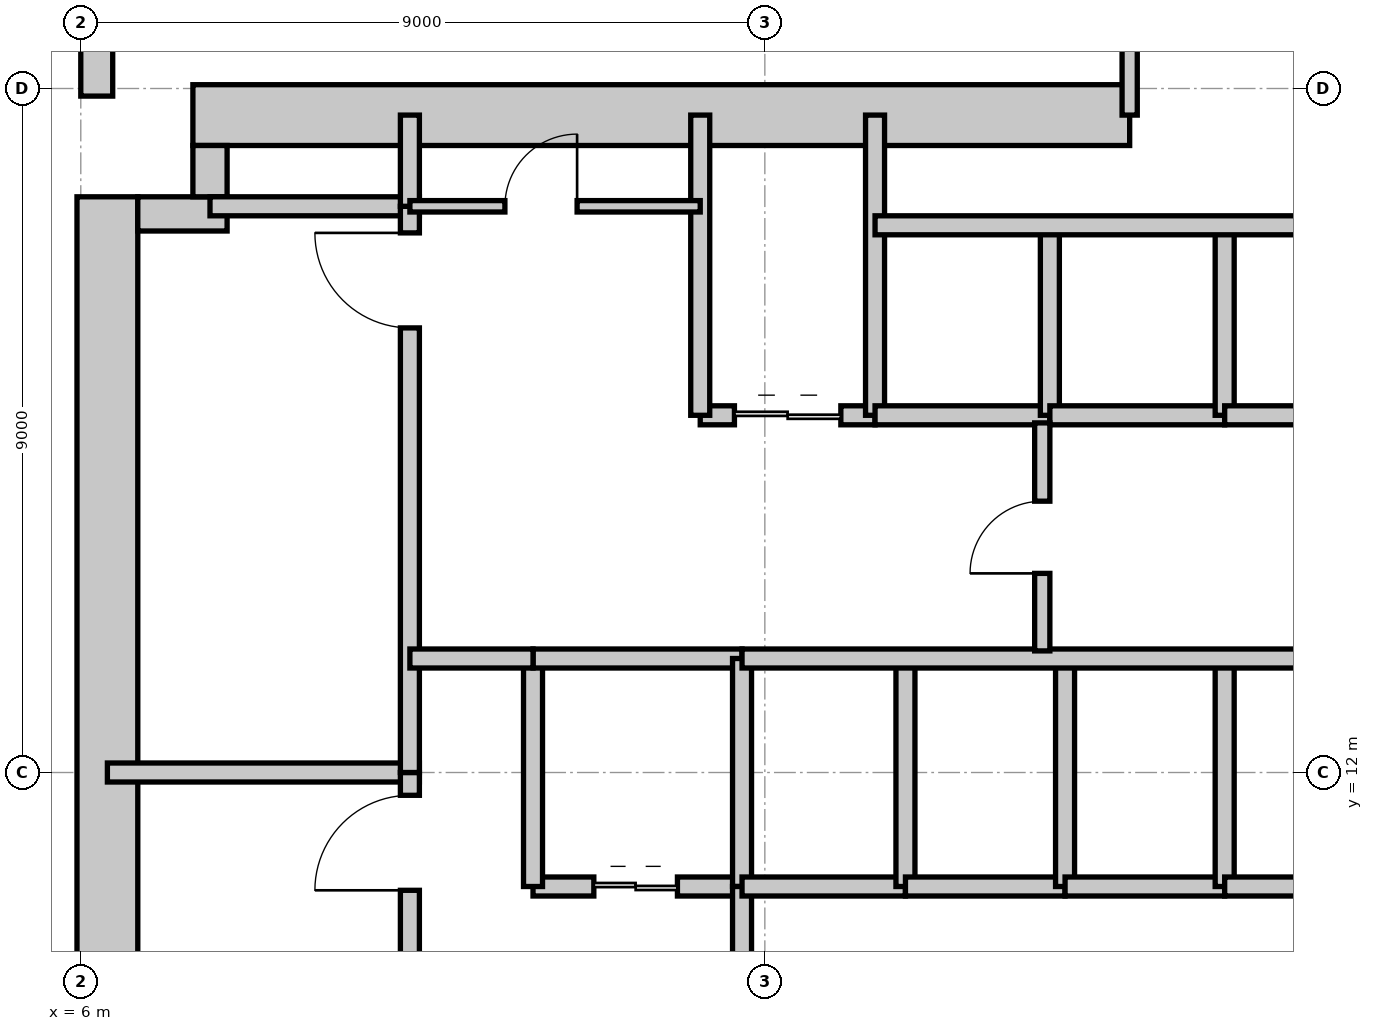
"""IFC4 building model, lengths in metres.
Left out: names, types, materials, properties, quantities, classifications, styles, units other than length and angle.
Written with IfcOpenShell. Run it as: python <this file> out.ifc"""

import sys

from ifc_helpers import new_model, si_unit, direction, frame, frame_2d, origin, place, context, subcontext, project, spatial, rectangle, extrude, element, fill, save


model = new_model("IFC4")
c1 = context("Model", 3, precision=1e-05, world=origin(), true_north=direction((0.0, 1.0)))
c2 = subcontext(c1, "Body", "Model", "MODEL_VIEW")
j1 = project(units=[si_unit("LENGTHUNIT", "METRE"), si_unit("PLANEANGLEUNIT", "RADIAN")], contexts=[c1])
p1 = place(None, origin())
s1 = spatial("IfcSite", under=j1, at=p1, CompositionType="ELEMENT")
p2 = place(p1, origin())
s2 = spatial("IfcBuilding", under=s1, at=p2, CompositionType="ELEMENT")
p3 = place(p2, frame((0.0, 0.0, 38.4)))
s3 = spatial("IfcBuildingStorey", under=s2, at=p3, CompositionType="ELEMENT", Elevation=38.4)
p4 = place(p3, frame((6.35, 4.425, 0.0), z_axis=(0.0, 0.0, 1.0), x_axis=(0.0, 1.0, 0.0)))
e1 = element("IfcWall", 1, at=p4, inside=s3, PredefinedType="SHEAR", context=c2, shape_type="SweptSolid", body=[
    extrude(rectangle(XDim=15.15, YDim=0.8, at=frame_2d((7.575, 0.0))), origin(), (0.0, 0.0, 1.0), 4.2),
])
p5 = place(p3, frame((7.475, 20.65, 0.0), z_axis=(0.0, 0.0, 1.0), x_axis=(1.0, 0.0, 0.0)))
e2 = element("IfcWall", 2, at=p5, inside=s3, PredefinedType="SHEAR", context=c2, shape_type="SweptSolid", body=[
    extrude(rectangle(XDim=12.325, YDim=0.8, at=frame_2d((6.163, 0.0))), origin(), (0.0, 0.0, 1.0), 4.2),
])
p6 = place(p3, frame((6.75, 19.35, 0.0), z_axis=(0.0, 0.0, 1.0), x_axis=(1.0, 0.0, 0.0)))
e3 = element("IfcWall", 3, at=p6, inside=s3, PredefinedType="SHEAR", context=c2, shape_type="SweptSolid", body=[
    extrude(rectangle(XDim=1.175, YDim=0.45, at=frame_2d((0.587, 0.0))), origin(), (0.0, 0.0, 1.0), 4.2),
])
p7 = place(p3, frame((7.7, 19.575, 0.0), z_axis=(0.0, 0.0, 1.0), x_axis=(0.0, 1.0, 0.0)))
e4 = element("IfcWall", 4, at=p7, inside=s3, PredefinedType="SHEAR", context=c2, shape_type="SweptSolid", body=[
    extrude(rectangle(XDim=0.675, YDim=0.45, at=frame_2d((0.337, 0.0))), origin(), (0.0, 0.0, 1.0), 4.2),
])
p8 = place(p3, frame((6.21, 49.4, 0.0), z_axis=(0.0, 0.0, 1.0), x_axis=(0.0, -1.0, 0.0)))
e5 = element("IfcWall", 5, at=p8, inside=s3, PredefinedType="STANDARD", context=c2, shape_type="SweptSolid", body=[
    extrude(rectangle(XDim=28.5, YDim=0.42, at=frame_2d((14.25, 0.0))), origin(), (0.0, 0.0, 1.0), 3.98),
])
p9 = place(p8, frame((15.225, 0.0, 0.85)))
e6 = element("IfcOpeningElement", 6, at=p9, cuts=e5, PredefinedType="OPENING", context=c2, shape_type="SweptSolid", body=[
    extrude(rectangle(XDim=2.8, YDim=2.45, at=frame_2d((1.4, 1.225))), frame((0.0, 0.22, 0.0), z_axis=(0.0, -1.0, 0.0), x_axis=(1.0, 0.0, 0.0)), (0.0, 0.0, 1.0), 0.44),
])
p10 = place(p3, frame((6.35, 12.0, 0.0), z_axis=(0.0, 0.0, 1.0), x_axis=(1.0, 0.0, 0.0)))
e7 = element("IfcWall", 7, at=p10, inside=s3, PredefinedType="SHEAR", context=c2, shape_type="SweptSolid", body=[
    extrude(rectangle(XDim=4.105, YDim=0.25, at=frame_2d((2.052, 0.0))), origin(), (0.0, 0.0, 1.0), 4.2),
])
p11 = place(p3, frame((7.7, 19.45, 0.0), z_axis=(0.0, 0.0, 1.0), x_axis=(1.0, 0.0, 0.0)))
e8 = element("IfcWall", 8, at=p11, inside=s3, PredefinedType="SHEAR", context=c2, shape_type="SweptSolid", body=[
    extrude(rectangle(XDim=2.755, YDim=0.25, at=frame_2d((1.377, 0.0))), origin(), (0.0, 0.0, 1.0), 4.2),
])
p12 = place(p3, frame((10.33, 4.55, 0.0), z_axis=(0.0, 0.0, 1.0), x_axis=(0.0, 1.0, 0.0)))
e9 = element("IfcWall", 9, at=p12, inside=s3, PredefinedType="SHEAR", context=c2, shape_type="SweptSolid", body=[
    extrude(rectangle(XDim=7.45, YDim=0.25, at=frame_2d((3.725, 0.0))), origin(), (0.0, 0.0, 1.0), 4.2),
])
p13 = place(p12, frame((5.9, 0.0, 0.0)))
e10 = element("IfcOpeningElement", 10, at=p13, cuts=e9, PredefinedType="OPENING", context=c2, shape_type="SweptSolid", body=[
    extrude(rectangle(XDim=1.25, YDim=2.2, at=frame_2d((0.625, 1.1))), frame((0.0, 0.135, 0.0), z_axis=(0.0, -1.0, 0.0), x_axis=(1.0, 0.0, 0.0)), (0.0, 0.0, 1.0), 0.27),
])
p14 = place(p3, frame((10.33, 12.0, 0.0), z_axis=(0.0, 0.0, 1.0), x_axis=(0.0, 1.0, 0.0)))
e11 = element("IfcWall", 11, at=p14, inside=s3, PredefinedType="SHEAR", context=c2, shape_type="SweptSolid", body=[
    extrude(rectangle(XDim=7.45, YDim=0.25, at=frame_2d((3.725, 0.0))), origin(), (0.0, 0.0, 1.0), 4.2),
])
p15 = place(p14, frame((5.85, 0.0, 0.0)))
e12 = element("IfcOpeningElement", 12, at=p15, cuts=e11, PredefinedType="OPENING", context=c2, shape_type="SweptSolid", body=[
    extrude(rectangle(XDim=1.25, YDim=2.2, at=frame_2d((0.625, 1.1))), frame((0.0, 0.135, 0.0), z_axis=(0.0, -1.0, 0.0), x_axis=(1.0, 0.0, 0.0)), (0.0, 0.0, 1.0), 0.27),
])
p16 = place(p3, frame((10.33, 19.45, 0.0), z_axis=(0.0, 0.0, 1.0), x_axis=(0.0, 1.0, 0.0)))
e13 = element("IfcWall", 13, at=p16, inside=s3, PredefinedType="PARTITIONING", context=c2, shape_type="SweptSolid", body=[
    extrude(rectangle(XDim=1.2, YDim=0.25, at=frame_2d((0.6, 0.0))), origin(), (0.0, 0.0, 1.0), 3.114),
])
p17 = place(p3, frame((11.95, 10.5, 0.0), z_axis=(0.0, 0.0, 1.0), x_axis=(1.0, 0.0, 0.0)))
e14 = element("IfcWall", 14, at=p17, inside=s3, PredefinedType="PARTITIONING", context=c2, shape_type="SweptSolid", body=[
    extrude(rectangle(XDim=2.75, YDim=0.25, at=frame_2d((1.375, 0.0))), origin(), (0.0, 0.0, 1.0), 3.426),
])
p18 = place(p17, frame((0.8, 0.0, 0.0)))
e15 = element("IfcOpeningElement", 15, at=p18, cuts=e14, PredefinedType="OPENING", context=c2, shape_type="SweptSolid", body=[
    extrude(rectangle(XDim=1.1, YDim=2.25, at=frame_2d((0.55, 1.125))), frame((0.0, 0.135, 0.0), z_axis=(0.0, -1.0, 0.0), x_axis=(1.0, 0.0, 0.0)), (0.0, 0.0, 1.0), 0.27),
])
p19 = place(p3, frame((11.95, 10.5, 0.0), z_axis=(0.0, 0.0, 1.0), x_axis=(0.0, 1.0, 0.0)))
e16 = element("IfcWall", 16, at=p19, inside=s3, PredefinedType="PARTITIONING", context=c2, shape_type="SweptSolid", body=[
    extrude(rectangle(XDim=3.0, YDim=0.25, at=frame_2d((1.5, 0.0))), origin(), (0.0, 0.0, 1.0), 3.97),
])
p20 = place(p3, frame((11.95, 13.5, 0.0), z_axis=(0.0, 0.0, 1.0), x_axis=(1.0, 0.0, 0.0)))
e17 = element("IfcWall", 17, at=p20, inside=s3, PredefinedType="PARTITIONING", context=c2, shape_type="SweptSolid", body=[
    extrude(rectangle(XDim=2.75, YDim=0.25, at=frame_2d((1.375, 0.0))), origin(), (0.0, 0.0, 1.0), 3.426),
])
p21 = place(p3, frame((14.7, 10.5, 0.0), z_axis=(0.0, 0.0, 1.0), x_axis=(0.0, 1.0, 0.0)))
e18 = element("IfcWall", 18, at=p21, inside=s3, PredefinedType="PARTITIONING", context=c2, shape_type="SweptSolid", body=[
    extrude(rectangle(XDim=3.0, YDim=0.25, at=frame_2d((1.5, 0.0))), origin(), (0.0, 0.0, 1.0), 3.97),
])
p22 = place(p3, frame((14.7, 6.7, 0.0), z_axis=(0.0, 0.0, 1.0), x_axis=(0.0, 1.0, 0.0)))
e19 = element("IfcWall", 19, at=p22, inside=s3, PredefinedType="PARTITIONING", context=c2, shape_type="SweptSolid", body=[
    extrude(rectangle(XDim=3.8, YDim=0.25, at=frame_2d((1.9, 0.0))), origin(), (0.0, 0.0, 1.0), 3.97),
])
p23 = place(p22, frame((1.3, 0.0, 0.0)))
e20 = element("IfcOpeningElement", 20, at=p23, cuts=e19, PredefinedType="OPENING", context=c2, shape_type="SweptSolid", body=[
    extrude(rectangle(XDim=1.2, YDim=2.2, at=frame_2d((0.6, 1.1))), frame((0.0, 0.135, 0.0), z_axis=(0.0, -1.0, 0.0), x_axis=(1.0, 0.0, 0.0)), (0.0, 0.0, 1.0), 0.27),
])
p24 = place(p3, frame((10.33, 13.5, 0.0), z_axis=(0.0, 0.0, 1.0), x_axis=(1.0, 0.0, 0.0)))
e21 = element("IfcWall", 21, at=p24, inside=s3, PredefinedType="PARTITIONING", context=c2, shape_type="SweptSolid", body=[
    extrude(rectangle(XDim=1.62, YDim=0.25, at=frame_2d((0.81, 0.0))), origin(), (0.0, 0.0, 1.0), 3.426),
])
p25 = place(p3, frame((14.15, 16.7, 0.0), z_axis=(0.0, 0.0, 1.0), x_axis=(1.0, 0.0, 0.0)))
e22 = element("IfcWall", 22, at=p25, inside=s3, PredefinedType="PARTITIONING", context=c2, shape_type="SweptSolid", body=[
    extrude(rectangle(XDim=2.3, YDim=0.25, at=frame_2d((1.15, 0.0))), origin(), (0.0, 0.0, 1.0), 3.426),
])
p26 = place(p25, frame((0.45, 0.0, 0.0)))
e23 = element("IfcOpeningElement", 23, at=p26, cuts=e22, PredefinedType="OPENING", context=c2, shape_type="SweptSolid", body=[
    extrude(rectangle(XDim=1.4, YDim=2.35, at=frame_2d((0.7, 1.175))), frame((0.0, 0.135, 0.0), z_axis=(0.0, -1.0, 0.0), x_axis=(1.0, 0.0, 0.0)), (0.0, 0.0, 1.0), 0.27),
])
for number, where, z_axis, x_axis in (
    (24, (14.15, 16.7, 0.0), (0.0, 0.0, 1.0), (0.0, 1.0, 0.0)),
    (25, (16.45, 16.7, 0.0), (0.0, 0.0, 1.0), (0.0, 1.0, 0.0)),
):
    element("IfcWall", number, at=place(p3, frame(where, z_axis=z_axis, x_axis=x_axis)), inside=s3, PredefinedType="PARTITIONING", context=c2, shape_type="SweptSolid", body=[
        extrude(rectangle(XDim=3.95, YDim=0.25, at=frame_2d((1.975, 0.0))), origin(), (0.0, 0.0, 1.0), 3.97),
    ])
p27 = place(p3, frame((16.45, 16.7, 0.0), z_axis=(0.0, 0.0, 1.0), x_axis=(1.0, 0.0, 0.0)))
e26 = element("IfcWall", 26, at=p27, inside=s3, PredefinedType="PARTITIONING", context=c2, shape_type="SweptSolid", body=[
    extrude(rectangle(XDim=2.3, YDim=0.25, at=frame_2d((1.15, 0.0))), origin(), (0.0, 0.0, 1.0), 3.426),
])
p28 = place(p3, frame((18.75, 16.7, 0.0), z_axis=(0.0, 0.0, 1.0), x_axis=(0.0, 1.0, 0.0)))
e27 = element("IfcWall", 27, at=p28, inside=s3, PredefinedType="PARTITIONING", context=c2, shape_type="SweptSolid", body=[
    extrude(rectangle(XDim=2.5, YDim=0.25, at=frame_2d((1.25, 0.0))), origin(), (0.0, 0.0, 1.0), 3.97),
])
p29 = place(p3, frame((18.75, 16.7, 0.0), z_axis=(0.0, 0.0, 1.0), x_axis=(1.0, 0.0, 0.0)))
e28 = element("IfcWall", 28, at=p29, inside=s3, PredefinedType="PARTITIONING", context=c2, shape_type="SweptSolid", body=[
    extrude(rectangle(XDim=2.3, YDim=0.25, at=frame_2d((1.15, 0.0))), origin(), (0.0, 0.0, 1.0), 3.426),
])
p30 = place(p3, frame((21.05, 16.7, 0.0), z_axis=(0.0, 0.0, 1.0), x_axis=(0.0, 1.0, 0.0)))
e29 = element("IfcWall", 29, at=p30, inside=s3, PredefinedType="PARTITIONING", context=c2, shape_type="SweptSolid", body=[
    extrude(rectangle(XDim=2.5, YDim=0.25, at=frame_2d((1.25, 0.0))), origin(), (0.0, 0.0, 1.0), 3.97),
])
p31 = place(p3, frame((21.05, 16.7, 0.0), z_axis=(0.0, 0.0, 1.0), x_axis=(1.0, 0.0, 0.0)))
e30 = element("IfcWall", 30, at=p31, inside=s3, PredefinedType="PARTITIONING", context=c2, shape_type="SweptSolid", body=[
    extrude(rectangle(XDim=2.4, YDim=0.25, at=frame_2d((1.2, 0.0))), origin(), (0.0, 0.0, 1.0), 3.426),
])
p32 = place(p3, frame((16.45, 19.2, 0.0), z_axis=(0.0, 0.0, 1.0), x_axis=(1.0, 0.0, 0.0)))
e31 = element("IfcWall", 31, at=p32, inside=s3, PredefinedType="PARTITIONING", context=c2, shape_type="SweptSolid", body=[
    extrude(rectangle(XDim=7.2, YDim=0.25, at=frame_2d((3.6, 0.0))), origin(), (0.0, 0.0, 1.0), 3.97),
])
p33 = place(p3, frame((14.7, 10.5, 0.0), z_axis=(0.0, 0.0, 1.0), x_axis=(1.0, 0.0, 0.0)))
e32 = element("IfcWall", 32, at=p33, inside=s3, PredefinedType="PARTITIONING", context=c2, shape_type="SweptSolid", body=[
    extrude(rectangle(XDim=2.15, YDim=0.25, at=frame_2d((1.075, 0.0))), origin(), (0.0, 0.0, 1.0), 3.426),
])
p34 = place(p3, frame((16.85, 10.5, 0.0), z_axis=(0.0, 0.0, 1.0), x_axis=(0.0, 1.0, 0.0)))
e33 = element("IfcWall", 33, at=p34, inside=s3, PredefinedType="PARTITIONING", context=c2, shape_type="SweptSolid", body=[
    extrude(rectangle(XDim=3.0, YDim=0.25, at=frame_2d((1.5, 0.0))), origin(), (0.0, 0.0, 1.0), 3.97),
])
p35 = place(p3, frame((16.85, 10.5, 0.0), z_axis=(0.0, 0.0, 1.0), x_axis=(1.0, 0.0, 0.0)))
e34 = element("IfcWall", 34, at=p35, inside=s3, PredefinedType="PARTITIONING", context=c2, shape_type="SweptSolid", body=[
    extrude(rectangle(XDim=2.1, YDim=0.25, at=frame_2d((1.05, 0.0))), origin(), (0.0, 0.0, 1.0), 3.426),
])
p36 = place(p3, frame((18.95, 10.5, 0.0), z_axis=(0.0, 0.0, 1.0), x_axis=(0.0, 1.0, 0.0)))
e35 = element("IfcWall", 35, at=p36, inside=s3, PredefinedType="PARTITIONING", context=c2, shape_type="SweptSolid", body=[
    extrude(rectangle(XDim=3.0, YDim=0.25, at=frame_2d((1.5, 0.0))), origin(), (0.0, 0.0, 1.0), 3.97),
])
p37 = place(p3, frame((18.95, 10.5, 0.0), z_axis=(0.0, 0.0, 1.0), x_axis=(1.0, 0.0, 0.0)))
e36 = element("IfcWall", 36, at=p37, inside=s3, PredefinedType="PARTITIONING", context=c2, shape_type="SweptSolid", body=[
    extrude(rectangle(XDim=2.1, YDim=0.25, at=frame_2d((1.05, 0.0))), origin(), (0.0, 0.0, 1.0), 3.426),
])
p38 = place(p3, frame((21.05, 10.5, 0.0), z_axis=(0.0, 0.0, 1.0), x_axis=(0.0, 1.0, 0.0)))
e37 = element("IfcWall", 37, at=p38, inside=s3, PredefinedType="PARTITIONING", context=c2, shape_type="SweptSolid", body=[
    extrude(rectangle(XDim=3.0, YDim=0.25, at=frame_2d((1.5, 0.0))), origin(), (0.0, 0.0, 1.0), 3.97),
])
p39 = place(p3, frame((21.05, 10.5, 0.0), z_axis=(0.0, 0.0, 1.0), x_axis=(1.0, 0.0, 0.0)))
e38 = element("IfcWall", 38, at=p39, inside=s3, PredefinedType="PARTITIONING", context=c2, shape_type="SweptSolid", body=[
    extrude(rectangle(XDim=2.4, YDim=0.25, at=frame_2d((1.2, 0.0))), origin(), (0.0, 0.0, 1.0), 3.426),
])
p40 = place(p3, frame((14.7, 13.5, 0.0), z_axis=(0.0, 0.0, 1.0), x_axis=(1.0, 0.0, 0.0)))
e39 = element("IfcWall", 39, at=p40, inside=s3, PredefinedType="PARTITIONING", context=c2, shape_type="SweptSolid", body=[
    extrude(rectangle(XDim=8.95, YDim=0.25, at=frame_2d((4.475, 0.0))), origin(), (0.0, 0.0, 1.0), 3.426),
])
p41 = place(p3, frame((18.65, 13.6, 0.0), z_axis=(0.0, 0.0, 1.0), x_axis=(0.0, 1.0, 0.0)))
e40 = element("IfcWall", 40, at=p41, inside=s3, PredefinedType="PARTITIONING", context=c2, shape_type="SweptSolid", body=[
    extrude(rectangle(XDim=3.0, YDim=0.2, at=frame_2d((1.5, 0.0))), origin(), (0.0, 0.0, 1.0), 3.97),
])
p42 = place(p41, frame((1.02, 0.0, 0.0)))
e41 = element("IfcOpeningElement", 41, at=p42, cuts=e40, PredefinedType="OPENING", context=c2, shape_type="SweptSolid", body=[
    extrude(rectangle(XDim=0.95, YDim=2.1, at=frame_2d((0.475, 1.05))), frame((0.0, 0.11, 0.0), z_axis=(0.0, -1.0, 0.0), x_axis=(1.0, 0.0, 0.0)), (0.0, 0.0, 1.0), 0.22),
])
p43 = place(p3, frame((10.33, 19.45, 0.0), z_axis=(0.0, 0.0, 1.0), x_axis=(1.0, 0.0, 0.0)))
e42 = element("IfcWall", 42, at=p43, inside=s3, PredefinedType="PARTITIONING", context=c2, shape_type="SweptSolid", body=[
    extrude(rectangle(XDim=3.82, YDim=0.15, at=frame_2d((1.91, 0.0))), origin(), (0.0, 0.0, 1.0), 3.97),
])
p44 = place(p43, frame((1.25, 0.0, 0.0)))
e43 = element("IfcOpeningElement", 43, at=p44, cuts=e42, PredefinedType="OPENING", context=c2, shape_type="SweptSolid", body=[
    extrude(rectangle(XDim=0.95, YDim=2.1, at=frame_2d((0.475, 1.05))), frame((0.0, 0.085, 0.0), z_axis=(0.0, -1.0, 0.0), x_axis=(1.0, 0.0, 0.0)), (0.0, 0.0, 1.0), 0.17),
])
p45 = place(p3, frame((19.8, 20.65, 0.0), z_axis=(0.0, 0.0, 1.0), x_axis=(0.0, 1.0, 0.0)))
e44 = element("IfcWall", 44, at=p45, inside=s3, PredefinedType="PARTITIONING", context=c2, shape_type="SweptSolid", body=[
    extrude(rectangle(XDim=6.15, YDim=0.2, at=frame_2d((3.075, 0.0))), origin(), (0.0, 0.0, 1.0), 3.97),
])
p46 = place(p13, origin())
e45 = element("IfcDoor", 45, at=p46, inside=s3, OperationType="SINGLE_SWING_LEFT", PredefinedType="DOOR", context=c2, shape_type="SweptSolid", body=[
    extrude(rectangle(XDim=1.25, YDim=2.2, at=frame_2d((0.625, 1.1))), frame((0.0, 0.025, 0.0), z_axis=(0.0, -1.0, 0.0), x_axis=(1.0, 0.0, 0.0)), (0.0, 0.0, 1.0), 0.05),
])
fill(e10, e45)
p47 = place(p15, origin())
e46 = element("IfcDoor", 46, at=p47, inside=s3, OperationType="SINGLE_SWING_RIGHT", PredefinedType="DOOR", context=c2, shape_type="SweptSolid", body=[
    extrude(rectangle(XDim=1.25, YDim=2.2, at=frame_2d((0.625, 1.1))), frame((0.0, 0.025, 0.0), z_axis=(0.0, -1.0, 0.0), x_axis=(1.0, 0.0, 0.0)), (0.0, 0.0, 1.0), 0.05),
])
fill(e12, e46)
p48 = place(p18, origin())
e47 = element("IfcDoor", 47, at=p48, inside=s3, OperationType="DOUBLE_DOOR_SLIDING", PredefinedType="DOOR", context=c2, shape_type="SweptSolid", body=[
    extrude(rectangle(XDim=1.1, YDim=2.25, at=frame_2d((0.55, 1.125))), frame((0.0, 0.025, 0.0), z_axis=(0.0, -1.0, 0.0), x_axis=(1.0, 0.0, 0.0)), (0.0, 0.0, 1.0), 0.05),
])
fill(e15, e47)
p49 = place(p26, origin())
e48 = element("IfcDoor", 48, at=p49, inside=s3, OperationType="DOUBLE_DOOR_SLIDING", PredefinedType="DOOR", context=c2, shape_type="SweptSolid", body=[
    extrude(rectangle(XDim=1.4, YDim=2.35, at=frame_2d((0.7, 1.175))), frame((0.0, 0.025, 0.0), z_axis=(0.0, -1.0, 0.0), x_axis=(1.0, 0.0, 0.0)), (0.0, 0.0, 1.0), 0.05),
])
fill(e23, e48)
p50 = place(p42, origin())
e49 = element("IfcDoor", 49, at=p50, inside=s3, OperationType="SINGLE_SWING_LEFT", PredefinedType="DOOR", context=c2, shape_type="SweptSolid", body=[
    extrude(rectangle(XDim=0.95, YDim=2.1, at=frame_2d((0.475, 1.05))), frame((0.0, 0.025, 0.0), z_axis=(0.0, -1.0, 0.0), x_axis=(1.0, 0.0, 0.0)), (0.0, 0.0, 1.0), 0.05),
])
fill(e41, e49)
p51 = place(p44, origin())
e50 = element("IfcDoor", 50, at=p51, inside=s3, OperationType="SINGLE_SWING_RIGHT", PredefinedType="DOOR", context=c2, shape_type="SweptSolid", body=[
    extrude(rectangle(XDim=0.95, YDim=2.1, at=frame_2d((0.475, 1.05))), frame((0.0, 0.025, 0.0), z_axis=(0.0, -1.0, 0.0), x_axis=(1.0, 0.0, 0.0)), (0.0, 0.0, 1.0), 0.05),
])
fill(e43, e50)
save(model, sys.argv[1])
